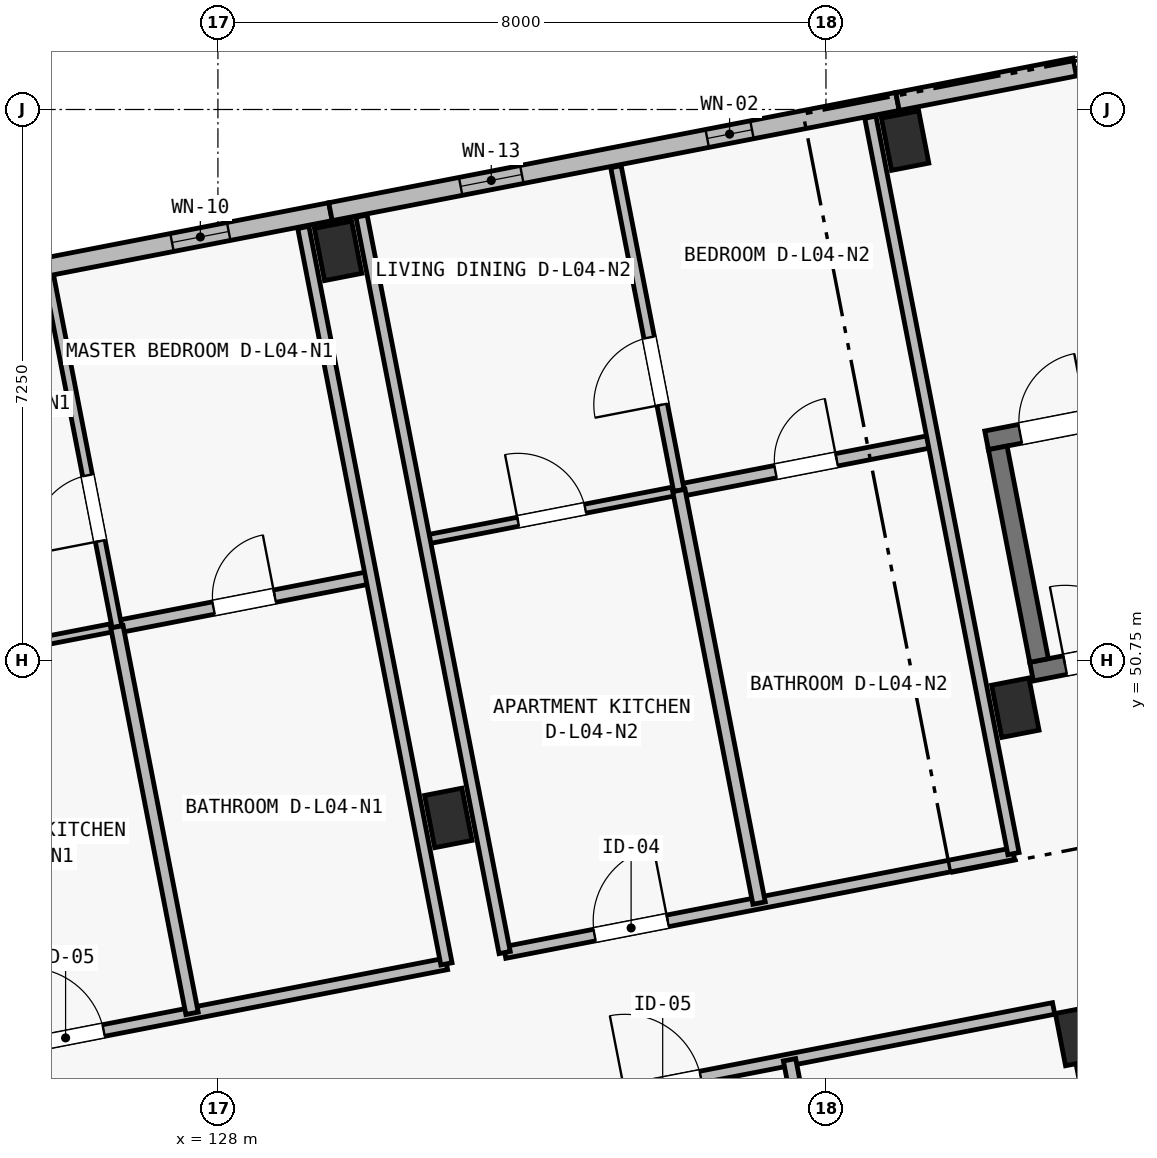
"""IFC4 building model, lengths in metres.
Left out: names, types, materials, properties, quantities, classifications, styles, units other than length and angle.
Written with IfcOpenShell. Run it as: python <this file> out.ifc"""

import sys

from ifc_helpers import new_model, si_unit, direction, frame, frame_2d, origin, origin_2d, place, context, subcontext, project, spatial, rectangle, extrude, element, fill, save


model = new_model("IFC4")
c1 = context("Model", 3, precision=1e-05, world=origin(), true_north=direction((0.0, 1.0)))
c2 = subcontext(c1, "Body", "Model", "MODEL_VIEW")
j1 = project(units=[si_unit("LENGTHUNIT", "METRE"), si_unit("PLANEANGLEUNIT", "RADIAN")], contexts=[c1])
p1 = place(None, origin())
s1 = spatial("IfcSite", under=j1, at=p1, CompositionType="ELEMENT")
p2 = place(p1, origin())
s2 = spatial("IfcBuilding", under=s1, at=p2, CompositionType="ELEMENT")
p3 = place(p2, frame((0.0, 0.0, 14.9)))
s3 = spatial("IfcBuildingStorey", under=s2, at=p3, CompositionType="ELEMENT", Elevation=14.9)
for number, where, z_axis, x_axis in (
    (1, (131.031, 48.68, 0.0), (0.0, 0.0, 1.0), (0.982, 0.191, 0.0)),
    (2, (129.581, 56.14, 0.0), (0.0, 0.0, 1.0), (0.982, 0.191, 0.0)),
    (3, (139.331, 45.811, 0.0), (0.0, 0.0, 1.0), (0.982, 0.191, 0.0)),
    (4, (138.491, 50.13, 0.0), (0.0, 0.0, 1.0), (0.982, 0.191, 0.0)),
    (5, (137.041, 57.59, 0.0), (0.0, 0.0, 1.0), (0.982, 0.191, 0.0)),
):
    element("IfcColumn", number, at=place(p3, frame(where, z_axis=z_axis, x_axis=x_axis)), inside=s3, PredefinedType="COLUMN", context=c2, shape_type="SweptSolid", body=[
        extrude(rectangle(XDim=0.5, YDim=0.7, at=origin_2d()), origin(), (0.0, 0.0, 1.0), 3.25),
    ])
p4 = place(p3, frame((140.714, 38.694, 0.0), z_axis=(0.0, 0.0, 1.0), x_axis=(-0.190819465253, 0.981625148252, 0.0)))
e6 = element("IfcWall", 6, at=p4, inside=s3, PredefinedType="SHEAR", context=c2, shape_type="SweptSolid", body=[
    extrude(rectangle(XDim=6.9, YDim=0.22, at=frame_2d((3.45, 0.0))), origin(), (0.0, 0.0, 1.0), 2.5),
])
p5 = place(p3, frame((138.113, 53.647, 0.0), z_axis=(0.0, 0.0, 1.0), x_axis=(0.981626097708, 0.19081458094, 0.0)))
e7 = element("IfcWall", 7, at=p5, inside=s3, PredefinedType="SHEAR", context=c2, shape_type="SweptSolid", body=[
    extrude(rectangle(XDim=7.0, YDim=0.25, at=frame_2d((3.5, 0.0))), origin(), (0.0, 0.0, 1.0), 3.25),
])
p6 = place(p5, frame((0.45, 0.0, 0.0)))
e8 = element("IfcOpeningElement", 8, at=p6, cuts=e7, PredefinedType="OPENING", context=c2, shape_type="SweptSolid", body=[
    extrude(rectangle(XDim=0.9, YDim=2.1, at=frame_2d((0.45, 1.05))), frame((0.0, 0.14, 0.0), z_axis=(0.0, -1.0, 0.0), x_axis=(1.0, 0.0, 0.0)), (0.0, 0.0, 1.0), 0.28),
])
p7 = place(p3, frame((138.705, 50.604, 0.0), z_axis=(0.0, 0.0, 1.0), x_axis=(0.981626097708, 0.19081458094, 0.0)))
e9 = element("IfcWall", 9, at=p7, inside=s3, PredefinedType="SHEAR", context=c2, shape_type="SweptSolid", body=[
    extrude(rectangle(XDim=7.0, YDim=0.25, at=frame_2d((3.5, 0.0))), origin(), (0.0, 0.0, 1.0), 3.25),
])
p8 = place(p7, frame((0.45, 0.0, 0.0)))
e10 = element("IfcOpeningElement", 10, at=p8, cuts=e9, PredefinedType="OPENING", context=c2, shape_type="SweptSolid", body=[
    extrude(rectangle(XDim=1.05, YDim=2.15, at=frame_2d((0.525, 1.075))), frame((0.0, 0.14, 0.0), z_axis=(0.0, -1.0, 0.0), x_axis=(1.0, 0.0, 0.0)), (0.0, 0.0, 1.0), 0.28),
])
p9 = place(p3, frame((138.804, 50.751, 0.0), z_axis=(0.0, 0.0, 1.0), x_axis=(-0.190858194834, 0.981617618762, 0.0)))
e11 = element("IfcWall", 11, at=p9, inside=s3, PredefinedType="SHEAR", context=c2, shape_type="SweptSolid", body=[
    extrude(rectangle(XDim=2.85, YDim=0.25, at=frame_2d((1.425, 0.0))), origin(), (0.0, 0.0, 1.0), 3.25),
])
p10 = place(p3, frame((122.02, 55.205, 0.0), z_axis=(0.0, 0.0, 1.0), x_axis=(0.981626422232, 0.190812911449, 0.0)))
e12 = element("IfcWall", 12, at=p10, inside=s3, PredefinedType="SOLIDWALL", context=c2, shape_type="SweptSolid", body=[
    extrude(rectangle(XDim=7.6, YDim=0.24, at=frame_2d((3.8, 0.0))), origin(), (0.0, 0.0, 1.0), 3.0),
])
p11 = place(p10, frame((0.922, 0.0, 0.5)))
e13 = element("IfcOpeningElement", 13, at=p11, cuts=e12, PredefinedType="OPENING", context=c2, shape_type="SweptSolid", body=[
    extrude(rectangle(XDim=0.68, YDim=2.24, at=frame_2d((0.34, 1.12))), frame((0.0, 0.135, 0.0), z_axis=(0.0, -1.0, 0.0), x_axis=(1.0, 0.0, 0.0)), (0.0, 0.0, 1.0), 0.27),
])
p12 = place(p10, frame((5.476, 0.0, 0.44)))
e14 = element("IfcOpeningElement", 14, at=p12, cuts=e12, PredefinedType="OPENING", context=c2, shape_type="SweptSolid", body=[
    extrude(rectangle(XDim=0.76, YDim=2.34, at=frame_2d((0.38, 1.17))), frame((0.0, 0.135, 0.0), z_axis=(0.0, -1.0, 0.0), x_axis=(1.0, 0.0, 0.0)), (0.0, 0.0, 1.0), 0.27),
])
p13 = place(p3, frame((129.481, 56.656, 0.0), z_axis=(0.0, 0.0, 1.0), x_axis=(0.981626422232, 0.190812911449, 0.0)))
e15 = element("IfcWall", 15, at=p13, inside=s3, PredefinedType="SOLIDWALL", context=c2, shape_type="SweptSolid", body=[
    extrude(rectangle(XDim=7.6, YDim=0.24, at=frame_2d((3.8, 0.0))), origin(), (0.0, 0.0, 1.0), 3.0),
])
p14 = place(p13, frame((1.745, 0.0, 0.44)))
e16 = element("IfcOpeningElement", 16, at=p14, cuts=e15, PredefinedType="OPENING", context=c2, shape_type="SweptSolid", body=[
    extrude(rectangle(XDim=0.82, YDim=2.18, at=frame_2d((0.41, 1.09))), frame((0.0, 0.135, 0.0), z_axis=(0.0, -1.0, 0.0), x_axis=(1.0, 0.0, 0.0)), (0.0, 0.0, 1.0), 0.27),
])
p15 = place(p13, frame((5.05, 0.0, 0.5)))
e17 = element("IfcOpeningElement", 17, at=p15, cuts=e15, PredefinedType="OPENING", context=c2, shape_type="SweptSolid", body=[
    extrude(rectangle(XDim=0.6, YDim=2.22, at=frame_2d((0.3, 1.11))), frame((0.0, 0.135, 0.0), z_axis=(0.0, -1.0, 0.0), x_axis=(1.0, 0.0, 0.0)), (0.0, 0.0, 1.0), 0.27),
])
p16 = place(p3, frame((136.941, 58.106, 0.0), z_axis=(0.0, 0.0, 1.0), x_axis=(0.981629832251, 0.190795367961, 0.0)))
e18 = element("IfcWall", 18, at=p16, inside=s3, PredefinedType="SOLIDWALL", context=c2, shape_type="SweptSolid", body=[
    extrude(rectangle(XDim=2.375, YDim=0.24, at=frame_2d((1.188, 0.0))), origin(), (0.0, 0.0, 1.0), 3.0),
])
p17 = place(p3, frame((132.046, 44.823, 0.0), z_axis=(0.0, 0.0, 1.0), x_axis=(0.9816234647, 0.190828125677, 0.0)))
e19 = element("IfcWall", 19, at=p17, inside=s3, PredefinedType="PARTITIONING", context=c2, shape_type="SweptSolid", body=[
    extrude(rectangle(XDim=7.08, YDim=0.155, at=frame_2d((3.54, 0.0))), origin(), (0.0, 0.0, 1.0), 2.97),
])
p18 = place(p17, frame((1.33, 0.0, 0.0)))
e20 = element("IfcOpeningElement", 20, at=p18, cuts=e19, PredefinedType="OPENING", context=c2, shape_type="SweptSolid", body=[
    extrude(rectangle(XDim=1.02, YDim=2.2, at=frame_2d((0.51, 1.1))), frame((0.0, 0.093, 0.0), z_axis=(0.0, -1.0, 0.0), x_axis=(1.0, 0.0, 0.0)), (0.0, 0.0, 1.0), 0.185),
])
p19 = place(p3, frame((136.23, 41.846, 0.0), z_axis=(0.0, 0.0, 1.0), x_axis=(-0.190850336204, 0.981619146701, 0.0)))
e21 = element("IfcWall", 21, at=p19, inside=s3, PredefinedType="PLUMBINGWALL", context=c2, shape_type="SweptSolid", body=[
    extrude(rectangle(XDim=3.72, YDim=0.165, at=frame_2d((1.86, 0.0))), origin(), (0.0, 0.0, 1.0), 2.97),
])
p20 = place(p3, frame((124.312, 45.459, 0.0), z_axis=(0.0, 0.0, 1.0), x_axis=(0.981627870431, 0.190805461121, 0.0)))
e22 = element("IfcWall", 22, at=p20, inside=s3, PredefinedType="PARTITIONING", context=c2, shape_type="SweptSolid", body=[
    extrude(rectangle(XDim=6.82, YDim=0.155, at=frame_2d((3.41, 0.0))), origin(), (0.0, 0.0, 1.0), 2.97),
])
p21 = place(p20, frame((1.205, 0.0, 0.0)))
e23 = element("IfcOpeningElement", 23, at=p21, cuts=e22, PredefinedType="OPENING", context=c2, shape_type="SweptSolid", body=[
    extrude(rectangle(XDim=1.02, YDim=2.2, at=frame_2d((0.51, 1.1))), frame((0.0, 0.093, 0.0), z_axis=(0.0, -1.0, 0.0), x_axis=(1.0, 0.0, 0.0)), (0.0, 0.0, 1.0), 0.185),
])
p22 = place(p3, frame((123.324, 50.543, 0.0), z_axis=(0.0, 0.0, 1.0), x_axis=(0.981629173664, 0.190798756314, 0.0)))
e24 = element("IfcWall", 24, at=p22, inside=s3, PredefinedType="PARTITIONING", context=c2, shape_type="SweptSolid", body=[
    extrude(rectangle(XDim=3.41, YDim=0.11, at=frame_2d((1.705, 0.0))), origin(), (0.0, 0.0, 1.0), 2.97),
])
p23 = place(p22, frame((1.255, 0.0, 0.0)))
e25 = element("IfcOpeningElement", 25, at=p23, cuts=e24, PredefinedType="OPENING", context=c2, shape_type="SweptSolid", body=[
    extrude(rectangle(XDim=0.9, YDim=2.1, at=frame_2d((0.45, 1.05))), frame((0.0, 0.07, 0.0), z_axis=(0.0, -1.0, 0.0), x_axis=(1.0, 0.0, 0.0)), (0.0, 0.0, 1.0), 0.14),
])
p24 = place(p3, frame((126.671, 51.194, 0.0), z_axis=(0.0, 0.0, 1.0), x_axis=(0.981629173664, 0.190798756314, 0.0)))
e26 = element("IfcWall", 26, at=p24, inside=s3, PredefinedType="PLUMBINGWALL", context=c2, shape_type="SweptSolid", body=[
    extrude(rectangle(XDim=3.41, YDim=0.165, at=frame_2d((1.705, 0.0))), origin(), (0.0, 0.0, 1.0), 2.97),
])
p25 = place(p24, frame((1.295, 0.0, 0.0)))
e27 = element("IfcOpeningElement", 27, at=p25, cuts=e26, PredefinedType="OPENING", context=c2, shape_type="SweptSolid", body=[
    extrude(rectangle(XDim=0.82, YDim=2.08, at=frame_2d((0.41, 1.04))), frame((0.0, 0.097, 0.0), z_axis=(0.0, -1.0, 0.0), x_axis=(1.0, 0.0, 0.0)), (0.0, 0.0, 1.0), 0.195),
])
p26 = place(p3, frame((126.671, 51.194, 0.0), z_axis=(0.0, 0.0, 1.0), x_axis=(-0.190787451574, 0.981631370893, 0.0)))
e28 = element("IfcWall", 28, at=p26, inside=s3, PredefinedType="PARTITIONING", context=c2, shape_type="SweptSolid", body=[
    extrude(rectangle(XDim=4.69, YDim=0.13, at=frame_2d((2.345, 0.0))), origin(), (0.0, 0.0, 1.0), 2.97),
])
p27 = place(p26, frame((1.15, 0.0, 0.0)))
e29 = element("IfcOpeningElement", 29, at=p27, cuts=e28, PredefinedType="OPENING", context=c2, shape_type="SweptSolid", body=[
    extrude(rectangle(XDim=0.88, YDim=2.1, at=frame_2d((0.44, 1.05))), frame((0.0, 0.08, 0.0), z_axis=(0.0, -1.0, 0.0), x_axis=(1.0, 0.0, 0.0)), (0.0, 0.0, 1.0), 0.16),
])
p28 = place(p3, frame((127.66, 46.109, 0.0), z_axis=(0.0, 0.0, 1.0), x_axis=(-0.190838120755, 0.981621521599, 0.0)))
e30 = element("IfcWall", 30, at=p28, inside=s3, PredefinedType="PLUMBINGWALL", context=c2, shape_type="SweptSolid", body=[
    extrude(rectangle(XDim=5.18, YDim=0.165, at=frame_2d((2.59, 0.0))), origin(), (0.0, 0.0, 1.0), 2.97),
])
p29 = place(p3, frame((131.007, 46.76, 0.0), z_axis=(0.0, 0.0, 1.0), x_axis=(-0.190809410863, 0.981627102685, 0.0)))
e31 = element("IfcWall", 31, at=p29, inside=s3, PredefinedType="PARTITIONING", context=c2, shape_type="SweptSolid", body=[
    extrude(rectangle(XDim=9.87, YDim=0.15, at=frame_2d((4.935, 0.0))), origin(), (0.0, 0.0, 1.0), 2.97),
])
p30 = place(p3, frame((131.772, 46.909, 0.0), z_axis=(0.0, 0.0, 1.0), x_axis=(0.981622468528, 0.190833249935, 0.0)))
e32 = element("IfcWall", 32, at=p30, inside=s3, PredefinedType="PARTITIONING", context=c2, shape_type="SweptSolid", body=[
    extrude(rectangle(XDim=6.82, YDim=0.155, at=frame_2d((3.41, 0.0))), origin(), (0.0, 0.0, 1.0), 2.97),
])
p31 = place(p30, frame((1.205, 0.0, 0.0)))
e33 = element("IfcOpeningElement", 33, at=p31, cuts=e32, PredefinedType="OPENING", context=c2, shape_type="SweptSolid", body=[
    extrude(rectangle(XDim=0.98, YDim=2.15, at=frame_2d((0.49, 1.075))), frame((0.0, 0.093, 0.0), z_axis=(0.0, -1.0, 0.0), x_axis=(1.0, 0.0, 0.0)), (0.0, 0.0, 1.0), 0.185),
])
p32 = place(p3, frame((130.717, 52.337, 0.0), z_axis=(0.0, 0.0, 1.0), x_axis=(0.981629173664, 0.190798756314, 0.0)))
e34 = element("IfcWall", 34, at=p32, inside=s3, PredefinedType="PARTITIONING", context=c2, shape_type="SweptSolid", body=[
    extrude(rectangle(XDim=3.41, YDim=0.12, at=frame_2d((1.705, 0.0))), origin(), (0.0, 0.0, 1.0), 2.97),
])
p33 = place(p32, frame((1.255, 0.0, 0.0)))
e35 = element("IfcOpeningElement", 35, at=p33, cuts=e34, PredefinedType="OPENING", context=c2, shape_type="SweptSolid", body=[
    extrude(rectangle(XDim=0.9, YDim=2.1, at=frame_2d((0.45, 1.05))), frame((0.0, 0.075, 0.0), z_axis=(0.0, -1.0, 0.0), x_axis=(1.0, 0.0, 0.0)), (0.0, 0.0, 1.0), 0.15),
])
p34 = place(p3, frame((134.065, 52.988, 0.0), z_axis=(0.0, 0.0, 1.0), x_axis=(0.981629173664, 0.190798756314, 0.0)))
e36 = element("IfcWall", 36, at=p34, inside=s3, PredefinedType="PLUMBINGWALL", context=c2, shape_type="SweptSolid", body=[
    extrude(rectangle(XDim=3.41, YDim=0.165, at=frame_2d((1.705, 0.0))), origin(), (0.0, 0.0, 1.0), 2.97),
])
p35 = place(p34, frame((1.295, 0.0, 0.0)))
e37 = element("IfcOpeningElement", 37, at=p35, cuts=e36, PredefinedType="OPENING", context=c2, shape_type="SweptSolid", body=[
    extrude(rectangle(XDim=0.82, YDim=2.08, at=frame_2d((0.41, 1.04))), frame((0.0, 0.097, 0.0), z_axis=(0.0, -1.0, 0.0), x_axis=(1.0, 0.0, 0.0)), (0.0, 0.0, 1.0), 0.195),
])
p36 = place(p3, frame((134.065, 52.988, 0.0), z_axis=(0.0, 0.0, 1.0), x_axis=(-0.190812443151, 0.981626513262, 0.0)))
e38 = element("IfcWall", 38, at=p36, inside=s3, PredefinedType="PARTITIONING", context=c2, shape_type="SweptSolid", body=[
    extrude(rectangle(XDim=4.34, YDim=0.14, at=frame_2d((2.17, 0.0))), origin(), (0.0, 0.0, 1.0), 2.97),
])
p37 = place(p36, frame((1.15, 0.0, 0.0)))
e39 = element("IfcOpeningElement", 39, at=p37, cuts=e38, PredefinedType="OPENING", context=c2, shape_type="SweptSolid", body=[
    extrude(rectangle(XDim=0.9, YDim=2.1, at=frame_2d((0.45, 1.05))), frame((0.0, 0.085, 0.0), z_axis=(0.0, -1.0, 0.0), x_axis=(1.0, 0.0, 0.0)), (0.0, 0.0, 1.0), 0.17),
])
p38 = place(p3, frame((135.12, 47.559, 0.0), z_axis=(0.0, 0.0, 1.0), x_axis=(-0.190807031124, 0.981627565258, 0.0)))
e40 = element("IfcWall", 40, at=p38, inside=s3, PredefinedType="PLUMBINGWALL", context=c2, shape_type="SweptSolid", body=[
    extrude(rectangle(XDim=5.53, YDim=0.165, at=frame_2d((2.765, 0.0))), origin(), (0.0, 0.0, 1.0), 2.97),
])
p39 = place(p3, frame((131.772, 46.909, 0.0), z_axis=(0.0, 0.0, 1.0), x_axis=(-0.1907855758, 0.981631735462, 0.0)))
e41 = element("IfcWall", 41, at=p39, inside=s3, PredefinedType="PARTITIONING", context=c2, shape_type="SweptSolid", body=[
    extrude(rectangle(XDim=9.87, YDim=0.15, at=frame_2d((4.935, 0.0))), origin(), (0.0, 0.0, 1.0), 2.97),
])
p40 = place(p3, frame((138.467, 48.21, 0.0), z_axis=(0.0, 0.0, 1.0), x_axis=(-0.190814044018, 0.981626202078, 0.0)))
e42 = element("IfcWall", 42, at=p40, inside=s3, PredefinedType="PARTITIONING", context=c2, shape_type="SweptSolid", body=[
    extrude(rectangle(XDim=9.87, YDim=0.15, at=frame_2d((4.935, 0.0))), origin(), (0.0, 0.0, 1.0), 2.97),
])
p41 = place(p12, origin())
e43 = element("IfcWindow", 43, at=p41, inside=s3, PartitioningType="SINGLE_PANEL", PredefinedType="WINDOW", context=c2, shape_type="SweptSolid", body=[
    extrude(rectangle(XDim=0.76, YDim=2.34, at=frame_2d((0.38, 1.17))), frame((0.0, 0.03, 0.0), z_axis=(0.0, -1.0, 0.0), x_axis=(1.0, 0.0, 0.0)), (0.0, 0.0, 1.0), 0.06),
])
fill(e14, e43)
p42 = place(p14, origin())
e44 = element("IfcWindow", 44, at=p42, inside=s3, PartitioningType="SINGLE_PANEL", PredefinedType="WINDOW", context=c2, shape_type="SweptSolid", body=[
    extrude(rectangle(XDim=0.82, YDim=2.18, at=frame_2d((0.41, 1.09))), frame((0.0, 0.03, 0.0), z_axis=(0.0, -1.0, 0.0), x_axis=(1.0, 0.0, 0.0)), (0.0, 0.0, 1.0), 0.06),
])
fill(e16, e44)
p43 = place(p15, origin())
e45 = element("IfcWindow", 45, at=p43, inside=s3, PartitioningType="SINGLE_PANEL", PredefinedType="WINDOW", context=c2, shape_type="SweptSolid", body=[
    extrude(rectangle(XDim=0.6, YDim=2.22, at=frame_2d((0.3, 1.11))), frame((0.0, 0.03, 0.0), z_axis=(0.0, -1.0, 0.0), x_axis=(1.0, 0.0, 0.0)), (0.0, 0.0, 1.0), 0.06),
])
fill(e17, e45)
p44 = place(p18, origin())
e46 = element("IfcDoor", 46, at=p44, inside=s3, OperationType="SINGLE_SWING_LEFT", PredefinedType="DOOR", context=c2, shape_type="SweptSolid", body=[
    extrude(rectangle(XDim=1.02, YDim=2.2, at=frame_2d((0.51, 1.1))), frame((0.0, 0.025, 0.0), z_axis=(0.0, -1.0, 0.0), x_axis=(1.0, 0.0, 0.0)), (0.0, 0.0, 1.0), 0.05),
])
fill(e20, e46)
p45 = place(p21, origin())
e47 = element("IfcDoor", 47, at=p45, inside=s3, OperationType="SINGLE_SWING_LEFT", PredefinedType="DOOR", context=c2, shape_type="SweptSolid", body=[
    extrude(rectangle(XDim=1.02, YDim=2.2, at=frame_2d((0.51, 1.1))), frame((0.0, 0.025, 0.0), z_axis=(0.0, -1.0, 0.0), x_axis=(1.0, 0.0, 0.0)), (0.0, 0.0, 1.0), 0.05),
])
fill(e23, e47)
p46 = place(p25, origin())
e48 = element("IfcDoor", 48, at=p46, inside=s3, OperationType="SINGLE_SWING_RIGHT", PredefinedType="DOOR", context=c2, shape_type="SweptSolid", body=[
    extrude(rectangle(XDim=0.82, YDim=2.08, at=frame_2d((0.41, 1.04))), frame((0.0, 0.025, 0.0), z_axis=(0.0, -1.0, 0.0), x_axis=(1.0, 0.0, 0.0)), (0.0, 0.0, 1.0), 0.05),
])
fill(e27, e48)
p47 = place(p27, origin())
e49 = element("IfcDoor", 49, at=p47, inside=s3, OperationType="SINGLE_SWING_LEFT", PredefinedType="DOOR", context=c2, shape_type="SweptSolid", body=[
    extrude(rectangle(XDim=0.88, YDim=2.1, at=frame_2d((0.44, 1.05))), frame((0.0, 0.025, 0.0), z_axis=(0.0, -1.0, 0.0), x_axis=(1.0, 0.0, 0.0)), (0.0, 0.0, 1.0), 0.05),
])
fill(e29, e49)
p48 = place(p31, origin())
e50 = element("IfcDoor", 50, at=p48, inside=s3, OperationType="SINGLE_SWING_RIGHT", PredefinedType="DOOR", context=c2, shape_type="SweptSolid", body=[
    extrude(rectangle(XDim=0.98, YDim=2.15, at=frame_2d((0.49, 1.075))), frame((0.0, 0.025, 0.0), z_axis=(0.0, -1.0, 0.0), x_axis=(1.0, 0.0, 0.0)), (0.0, 0.0, 1.0), 0.05),
])
fill(e33, e50)
p49 = place(p33, origin())
e51 = element("IfcDoor", 51, at=p49, inside=s3, OperationType="SINGLE_SWING_LEFT", PredefinedType="DOOR", context=c2, shape_type="SweptSolid", body=[
    extrude(rectangle(XDim=0.9, YDim=2.1, at=frame_2d((0.45, 1.05))), frame((0.0, 0.025, 0.0), z_axis=(0.0, -1.0, 0.0), x_axis=(1.0, 0.0, 0.0)), (0.0, 0.0, 1.0), 0.05),
])
fill(e35, e51)
p50 = place(p35, origin())
e52 = element("IfcDoor", 52, at=p50, inside=s3, OperationType="SINGLE_SWING_RIGHT", PredefinedType="DOOR", context=c2, shape_type="SweptSolid", body=[
    extrude(rectangle(XDim=0.82, YDim=2.08, at=frame_2d((0.41, 1.04))), frame((0.0, 0.025, 0.0), z_axis=(0.0, -1.0, 0.0), x_axis=(1.0, 0.0, 0.0)), (0.0, 0.0, 1.0), 0.05),
])
fill(e37, e52)
p51 = place(p37, origin())
e53 = element("IfcDoor", 53, at=p51, inside=s3, OperationType="SINGLE_SWING_LEFT", PredefinedType="DOOR", context=c2, shape_type="SweptSolid", body=[
    extrude(rectangle(XDim=0.9, YDim=2.1, at=frame_2d((0.45, 1.05))), frame((0.0, 0.025, 0.0), z_axis=(0.0, -1.0, 0.0), x_axis=(1.0, 0.0, 0.0)), (0.0, 0.0, 1.0), 0.05),
])
fill(e39, e53)
p52 = place(p8, origin())
e54 = element("IfcDoor", 54, at=p52, inside=s3, OperationType="SINGLE_SWING_LEFT", PredefinedType="DOOR", context=c2, shape_type="SweptSolid", body=[
    extrude(rectangle(XDim=1.05, YDim=2.15, at=frame_2d((0.525, 1.075))), frame((0.0, 0.025, 0.0), z_axis=(0.0, -1.0, 0.0), x_axis=(1.0, 0.0, 0.0)), (0.0, 0.0, 1.0), 0.05),
])
fill(e10, e54)
p53 = place(p6, origin())
e55 = element("IfcDoor", 55, at=p53, inside=s3, OperationType="SINGLE_SWING_RIGHT", PredefinedType="DOOR", context=c2, shape_type="SweptSolid", body=[
    extrude(rectangle(XDim=0.9, YDim=2.1, at=frame_2d((0.45, 1.05))), frame((0.0, 0.025, 0.0), z_axis=(0.0, -1.0, 0.0), x_axis=(1.0, 0.0, 0.0)), (0.0, 0.0, 1.0), 0.05),
])
fill(e8, e55)
save(model, sys.argv[1])
